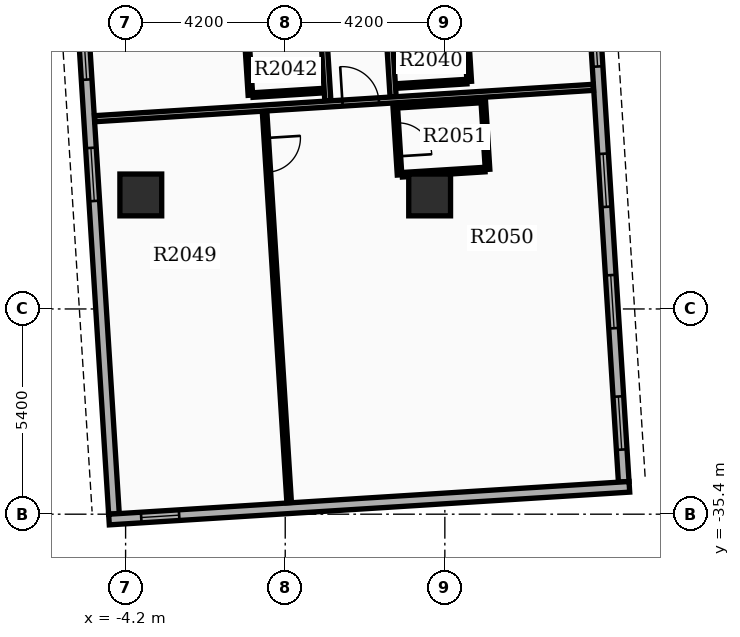
"""IFC4 building model, lengths in metres.
Left out: names, types, materials, properties, quantities, classifications, styles, units other than length and angle.
Written with IfcOpenShell. Run it as: python <this file> out.ifc"""

import sys

from ifc_helpers import new_model, si_unit, direction, frame, frame_2d, origin, origin_2d, place, context, subcontext, project, spatial, rectangle, extrude, element, fill, save


model = new_model("IFC4")
c1 = context("Model", 3, precision=1e-05, world=origin(), true_north=direction((0.0, 1.0)))
c2 = subcontext(c1, "Body", "Model", "MODEL_VIEW")
j1 = project(units=[si_unit("LENGTHUNIT", "METRE"), si_unit("PLANEANGLEUNIT", "RADIAN")], contexts=[c1])
p1 = place(None, origin())
s1 = spatial("IfcSite", under=j1, at=p1, CompositionType="ELEMENT")
p2 = place(p1, origin())
s2 = spatial("IfcBuilding", under=s1, at=p2, CompositionType="ELEMENT")
p3 = place(p2, frame((0.0, 0.0, 128.1)))
s3 = spatial("IfcBuildingStorey", under=s2, at=p3, CompositionType="ELEMENT", Elevation=128.1)
for number, where, z_axis, x_axis in (
    (1, (-3.8, -27.0, 0.0), (0.0, 0.0, 1.0), (1.0, 0.0, 0.0)),
    (2, (3.8, -27.0, 0.0), (0.0, 0.0, 1.0), (1.0, 0.0, 0.0)),
):
    element("IfcColumn", number, at=place(p3, frame(where, z_axis=z_axis, x_axis=x_axis)), inside=s3, PredefinedType="COLUMN", context=c2, shape_type="SweptSolid", body=[
        extrude(rectangle(XDim=1.1, YDim=1.1, at=origin_2d()), origin(), (0.0, 0.0, 1.0), 3.9),
    ])
p4 = place(p3, frame((-5.769, -15.333, 0.0), z_axis=(0.0, 0.0, 1.0), x_axis=(0.062784355807, -0.998027116198, 0.0)))
e3 = element("IfcWall", 3, at=p4, inside=s3, PredefinedType="STANDARD", context=c2, shape_type="SweptSolid", body=[
    extrude(rectangle(XDim=20.1, YDim=0.28, at=frame_2d((10.05, 0.0))), origin(), (0.0, 0.0, 1.0), 2.97),
])
p5 = place(p4, frame((0.85, 0.0, 0.8)))
e4 = element("IfcOpeningElement", 4, at=p5, cuts=e3, PredefinedType="OPENING", context=c2, shape_type="SweptSolid", body=[
    extrude(rectangle(XDim=1.4, YDim=1.6, at=frame_2d((0.7, 0.8))), frame((0.0, 0.15, 0.0), z_axis=(0.0, -1.0, 0.0), x_axis=(1.0, 0.0, 0.0)), (0.0, 0.0, 1.0), 0.3),
])
p6 = place(p4, frame((4.05, 0.0, 0.8)))
e5 = element("IfcOpeningElement", 5, at=p6, cuts=e3, PredefinedType="OPENING", context=c2, shape_type="SweptSolid", body=[
    extrude(rectangle(XDim=1.4, YDim=1.6, at=frame_2d((0.7, 0.8))), frame((0.0, 0.15, 0.0), z_axis=(0.0, -1.0, 0.0), x_axis=(1.0, 0.0, 0.0)), (0.0, 0.0, 1.0), 0.3),
])
p7 = place(p4, frame((7.25, 0.0, 0.8)))
e6 = element("IfcOpeningElement", 6, at=p7, cuts=e3, PredefinedType="OPENING", context=c2, shape_type="SweptSolid", body=[
    extrude(rectangle(XDim=1.4, YDim=1.6, at=frame_2d((0.7, 0.8))), frame((0.0, 0.15, 0.0), z_axis=(0.0, -1.0, 0.0), x_axis=(1.0, 0.0, 0.0)), (0.0, 0.0, 1.0), 0.3),
])
p8 = place(p4, frame((10.45, 0.0, 0.8)))
e7 = element("IfcOpeningElement", 7, at=p8, cuts=e3, PredefinedType="OPENING", context=c2, shape_type="SweptSolid", body=[
    extrude(rectangle(XDim=1.4, YDim=1.6, at=frame_2d((0.7, 0.8))), frame((0.0, 0.15, 0.0), z_axis=(0.0, -1.0, 0.0), x_axis=(1.0, 0.0, 0.0)), (0.0, 0.0, 1.0), 0.3),
])
p9 = place(p3, frame((8.907, -34.549, 0.0), z_axis=(0.0, 0.0, 1.0), x_axis=(-0.06279645424, 0.99802635503, 0.0)))
e8 = element("IfcWall", 8, at=p9, inside=s3, PredefinedType="STANDARD", context=c2, shape_type="SweptSolid", body=[
    extrude(rectangle(XDim=20.1, YDim=0.28, at=frame_2d((10.05, 0.0))), origin(), (0.0, 0.0, 1.0), 2.97),
])
p10 = place(p9, frame((0.85, 0.0, 0.8)))
e9 = element("IfcOpeningElement", 9, at=p10, cuts=e8, PredefinedType="OPENING", context=c2, shape_type="SweptSolid", body=[
    extrude(rectangle(XDim=1.4, YDim=1.6, at=frame_2d((0.7, 0.8))), frame((0.0, 0.15, 0.0), z_axis=(0.0, -1.0, 0.0), x_axis=(1.0, 0.0, 0.0)), (0.0, 0.0, 1.0), 0.3),
])
p11 = place(p9, frame((4.05, 0.0, 0.8)))
e10 = element("IfcOpeningElement", 10, at=p11, cuts=e8, PredefinedType="OPENING", context=c2, shape_type="SweptSolid", body=[
    extrude(rectangle(XDim=1.4, YDim=1.6, at=frame_2d((0.7, 0.8))), frame((0.0, 0.15, 0.0), z_axis=(0.0, -1.0, 0.0), x_axis=(1.0, 0.0, 0.0)), (0.0, 0.0, 1.0), 0.3),
])
p12 = place(p9, frame((7.25, 0.0, 0.8)))
e11 = element("IfcOpeningElement", 11, at=p12, cuts=e8, PredefinedType="OPENING", context=c2, shape_type="SweptSolid", body=[
    extrude(rectangle(XDim=1.4, YDim=1.6, at=frame_2d((0.7, 0.8))), frame((0.0, 0.15, 0.0), z_axis=(0.0, -1.0, 0.0), x_axis=(1.0, 0.0, 0.0)), (0.0, 0.0, 1.0), 0.3),
])
p13 = place(p9, frame((10.95, 0.0, 0.8)))
e12 = element("IfcOpeningElement", 12, at=p13, cuts=e8, PredefinedType="OPENING", context=c2, shape_type="SweptSolid", body=[
    extrude(rectangle(XDim=1.4, YDim=1.6, at=frame_2d((0.7, 0.8))), frame((0.0, 0.15, 0.0), z_axis=(0.0, -1.0, 0.0), x_axis=(1.0, 0.0, 0.0)), (0.0, 0.0, 1.0), 0.3),
])
p14 = place(p3, frame((-4.637, -35.541, 0.0), z_axis=(0.0, 0.0, 1.0), x_axis=(0.998026318072, 0.062797041623, 0.0)))
e13 = element("IfcWall", 13, at=p14, inside=s3, PredefinedType="STANDARD", context=c2, shape_type="SweptSolid", body=[
    extrude(rectangle(XDim=13.72, YDim=0.28, at=frame_2d((6.86, 0.0))), origin(), (0.0, 0.0, 1.0), 2.97),
])
p15 = place(p14, frame((0.85, 0.0, 0.85)))
e14 = element("IfcOpeningElement", 14, at=p15, cuts=e13, PredefinedType="OPENING", context=c2, shape_type="SweptSolid", body=[
    extrude(rectangle(XDim=1.0, YDim=1.5, at=frame_2d((0.5, 0.75))), frame((0.0, 0.15, 0.0), z_axis=(0.0, -1.0, 0.0), x_axis=(1.0, 0.0, 0.0)), (0.0, 0.0, 1.0), 0.3),
])
p16 = place(p3, frame((2.23, -14.739, 0.0), z_axis=(0.0, 0.0, 1.0), x_axis=(0.062771584278, -0.998027919553, 0.0)))
e15 = element("IfcWall", 15, at=p16, inside=s3, PredefinedType="PARTITIONING", context=c2, shape_type="SweptSolid", body=[
    extrude(rectangle(XDim=9.7, YDim=0.16, at=frame_2d((4.85, 0.0))), origin(), (0.0, 0.0, 1.0), 2.96),
])
p17 = place(p16, frame((1.033, 0.0, 0.0)))
e16 = element("IfcOpeningElement", 16, at=p17, cuts=e15, PredefinedType="OPENING", context=c2, shape_type="SweptSolid", body=[
    extrude(rectangle(XDim=0.96, YDim=2.15, at=frame_2d((0.48, 1.075))), frame((0.0, 0.09, 0.0), z_axis=(0.0, -1.0, 0.0), x_axis=(1.0, 0.0, 0.0)), (0.0, 0.0, 1.0), 0.18),
])
p18 = place(p3, frame((2.961, -24.132, 0.0), z_axis=(0.0, 0.0, 1.0), x_axis=(0.998027443946, 0.062779145668, 0.0)))
e17 = element("IfcWall", 17, at=p18, inside=s3, PredefinedType="PARTITIONING", context=c2, shape_type="SweptSolid", body=[
    extrude(rectangle(XDim=1.82, YDim=0.12, at=frame_2d((0.91, 0.0))), origin(), (0.0, 0.0, 1.0), 2.96),
])
p19 = place(p3, frame((4.724, -22.137, 0.0), z_axis=(0.0, 0.0, 1.0), x_axis=(0.062725942896, -0.998030789148, 0.0)))
e18 = element("IfcWall", 18, at=p19, inside=s3, PredefinedType="PARTITIONING", context=c2, shape_type="SweptSolid", body=[
    extrude(rectangle(XDim=1.88, YDim=0.12, at=frame_2d((0.94, 0.0))), origin(), (0.0, 0.0, 1.0), 2.96),
])
p20 = place(p3, frame((0.513, -14.847, 0.0), z_axis=(0.0, 0.0, 1.0), x_axis=(0.062798231534, -0.9980262432, 0.0)))
e19 = element("IfcWall", 19, at=p20, inside=s3, PredefinedType="PARTITIONING", context=c2, shape_type="SweptSolid", body=[
    extrude(rectangle(XDim=9.7, YDim=0.16, at=frame_2d((4.85, 0.0))), origin(), (0.0, 0.0, 1.0), 2.96),
])
p21 = place(p20, frame((1.033, 0.0, 0.0)))
e20 = element("IfcOpeningElement", 20, at=p21, cuts=e19, PredefinedType="OPENING", context=c2, shape_type="SweptSolid", body=[
    extrude(rectangle(XDim=0.96, YDim=2.15, at=frame_2d((0.48, 1.075))), frame((0.0, 0.09, 0.0), z_axis=(0.0, -1.0, 0.0), x_axis=(1.0, 0.0, 0.0)), (0.0, 0.0, 1.0), 0.18),
])
p22 = place(p3, frame((-0.851, -24.372, 0.0), z_axis=(0.0, 0.0, 1.0), x_axis=(0.998027443946, 0.062779145668, 0.0)))
e21 = element("IfcWall", 21, at=p22, inside=s3, PredefinedType="PARTITIONING", context=c2, shape_type="SweptSolid", body=[
    extrude(rectangle(XDim=1.82, YDim=0.12, at=frame_2d((0.91, 0.0))), origin(), (0.0, 0.0, 1.0), 2.96),
])
p23 = place(p3, frame((-1.034, -22.499, 0.0), z_axis=(0.0, 0.0, 1.0), x_axis=(0.062725942896, -0.998030789148, 0.0)))
e22 = element("IfcWall", 22, at=p23, inside=s3, PredefinedType="PARTITIONING", context=c2, shape_type="SweptSolid", body=[
    extrude(rectangle(XDim=1.88, YDim=0.12, at=frame_2d((0.94, 0.0))), origin(), (0.0, 0.0, 1.0), 2.96),
])
p24 = place(p3, frame((-5.012, -24.994, 0.0), z_axis=(0.0, 0.0, 1.0), x_axis=(0.998026109115, 0.062800362452, 0.0)))
e23 = element("IfcWall", 23, at=p24, inside=s3, PredefinedType="PARTITIONING", context=c2, shape_type="SweptSolid", body=[
    extrude(rectangle(XDim=13.144, YDim=0.16, at=frame_2d((6.572, 0.0))), origin(), (0.0, 0.0, 1.0), 2.96),
])
p25 = place(p24, frame((6.532, 0.0, 0.0)))
e24 = element("IfcOpeningElement", 24, at=p25, cuts=e23, PredefinedType="OPENING", context=c2, shape_type="SweptSolid", body=[
    extrude(rectangle(XDim=0.96, YDim=2.15, at=frame_2d((0.48, 1.075))), frame((0.0, 0.09, 0.0), z_axis=(0.0, -1.0, 0.0), x_axis=(1.0, 0.0, 0.0)), (0.0, 0.0, 1.0), 0.18),
])
p26 = place(p3, frame((-0.544, -24.803, 0.0), z_axis=(0.0, 0.0, 1.0), x_axis=(0.062786562543, -0.998026977373, 0.0)))
e25 = element("IfcWall", 25, at=p26, inside=s3, PredefinedType="PARTITIONING", context=c2, shape_type="SweptSolid", body=[
    extrude(rectangle(XDim=10.312, YDim=0.12, at=frame_2d((5.156, 0.0))), origin(), (0.0, 0.0, 1.0), 2.96),
])
p27 = place(p26, frame((0.7, 0.0, 0.0)))
e26 = element("IfcOpeningElement", 26, at=p27, cuts=e25, PredefinedType="OPENING", context=c2, shape_type="SweptSolid", body=[
    extrude(rectangle(XDim=0.9, YDim=2.1, at=frame_2d((0.45, 1.05))), frame((0.0, 0.07, 0.0), z_axis=(0.0, -1.0, 0.0), x_axis=(1.0, 0.0, 0.0)), (0.0, 0.0, 1.0), 0.14),
])
p28 = place(p3, frame((2.894, -24.657, 0.0), z_axis=(0.0, 0.0, 1.0), x_axis=(0.062912758763, -0.998019030272, 0.0)))
e27 = element("IfcWall", 27, at=p28, inside=s3, PredefinedType="PARTITIONING", context=c2, shape_type="SweptSolid", body=[
    extrude(rectangle(XDim=1.82, YDim=0.12, at=frame_2d((0.91, 0.0))), origin(), (0.0, 0.0, 1.0), 2.96),
])
p29 = place(p28, frame((0.45, 0.0, 0.0)))
e28 = element("IfcOpeningElement", 28, at=p29, cuts=e27, PredefinedType="OPENING", context=c2, shape_type="SweptSolid", body=[
    extrude(rectangle(XDim=0.88, YDim=2.1, at=frame_2d((0.44, 1.05))), frame((0.0, 0.07, 0.0), z_axis=(0.0, -1.0, 0.0), x_axis=(1.0, 0.0, 0.0)), (0.0, 0.0, 1.0), 0.14),
])
p30 = place(p3, frame((5.209, -24.511, 0.0), z_axis=(0.0, 0.0, 1.0), x_axis=(0.062645529196, -0.998035839873, 0.0)))
e29 = element("IfcWall", 29, at=p30, inside=s3, PredefinedType="PARTITIONING", context=c2, shape_type="SweptSolid", body=[
    extrude(rectangle(XDim=1.82, YDim=0.12, at=frame_2d((0.91, 0.0))), origin(), (0.0, 0.0, 1.0), 2.96),
])
p31 = place(p3, frame((2.964, -24.653, 0.0), z_axis=(0.0, 0.0, 1.0), x_axis=(0.99802414895, 0.06283150573, 0.0)))
e30 = element("IfcWall", 30, at=p31, inside=s3, PredefinedType="PARTITIONING", context=c2, shape_type="SweptSolid", body=[
    extrude(rectangle(XDim=2.18, YDim=0.12, at=frame_2d((1.09, 0.0))), origin(), (0.0, 0.0, 1.0), 2.96),
])
p32 = place(p3, frame((3.078, -26.469, 0.0), z_axis=(0.0, 0.0, 1.0), x_axis=(0.998024591026, 0.062824483344, 0.0)))
e31 = element("IfcWall", 31, at=p32, inside=s3, PredefinedType="PARTITIONING", context=c2, shape_type="SweptSolid", body=[
    extrude(rectangle(XDim=2.18, YDim=0.12, at=frame_2d((1.09, 0.0))), origin(), (0.0, 0.0, 1.0), 2.96),
])
p33 = place(p7, origin())
e32 = element("IfcWindow", 32, at=p33, inside=s3, PartitioningType="SINGLE_PANEL", PredefinedType="WINDOW", context=c2, shape_type="SweptSolid", body=[
    extrude(rectangle(XDim=1.4, YDim=1.6, at=frame_2d((0.7, 0.8))), frame((0.0, 0.03, 0.0), z_axis=(0.0, -1.0, 0.0), x_axis=(1.0, 0.0, 0.0)), (0.0, 0.0, 1.0), 0.06),
])
fill(e6, e32)
p34 = place(p8, origin())
e33 = element("IfcWindow", 33, at=p34, inside=s3, PartitioningType="SINGLE_PANEL", PredefinedType="WINDOW", context=c2, shape_type="SweptSolid", body=[
    extrude(rectangle(XDim=1.4, YDim=1.6, at=frame_2d((0.7, 0.8))), frame((0.0, 0.03, 0.0), z_axis=(0.0, -1.0, 0.0), x_axis=(1.0, 0.0, 0.0)), (0.0, 0.0, 1.0), 0.06),
])
fill(e7, e33)
p35 = place(p10, origin())
e34 = element("IfcWindow", 34, at=p35, inside=s3, PartitioningType="SINGLE_PANEL", PredefinedType="WINDOW", context=c2, shape_type="SweptSolid", body=[
    extrude(rectangle(XDim=1.4, YDim=1.6, at=frame_2d((0.7, 0.8))), frame((0.0, 0.03, 0.0), z_axis=(0.0, -1.0, 0.0), x_axis=(1.0, 0.0, 0.0)), (0.0, 0.0, 1.0), 0.06),
])
fill(e9, e34)
p36 = place(p11, origin())
e35 = element("IfcWindow", 35, at=p36, inside=s3, PartitioningType="SINGLE_PANEL", PredefinedType="WINDOW", context=c2, shape_type="SweptSolid", body=[
    extrude(rectangle(XDim=1.4, YDim=1.6, at=frame_2d((0.7, 0.8))), frame((0.0, 0.03, 0.0), z_axis=(0.0, -1.0, 0.0), x_axis=(1.0, 0.0, 0.0)), (0.0, 0.0, 1.0), 0.06),
])
fill(e10, e35)
p37 = place(p12, origin())
e36 = element("IfcWindow", 36, at=p37, inside=s3, PartitioningType="SINGLE_PANEL", PredefinedType="WINDOW", context=c2, shape_type="SweptSolid", body=[
    extrude(rectangle(XDim=1.4, YDim=1.6, at=frame_2d((0.7, 0.8))), frame((0.0, 0.03, 0.0), z_axis=(0.0, -1.0, 0.0), x_axis=(1.0, 0.0, 0.0)), (0.0, 0.0, 1.0), 0.06),
])
fill(e11, e36)
p38 = place(p13, origin())
e37 = element("IfcWindow", 37, at=p38, inside=s3, PartitioningType="SINGLE_PANEL", PredefinedType="WINDOW", context=c2, shape_type="SweptSolid", body=[
    extrude(rectangle(XDim=1.4, YDim=1.6, at=frame_2d((0.7, 0.8))), frame((0.0, 0.03, 0.0), z_axis=(0.0, -1.0, 0.0), x_axis=(1.0, 0.0, 0.0)), (0.0, 0.0, 1.0), 0.06),
])
fill(e12, e37)
p39 = place(p15, origin())
e38 = element("IfcWindow", 38, at=p39, inside=s3, PartitioningType="SINGLE_PANEL", PredefinedType="WINDOW", context=c2, shape_type="SweptSolid", body=[
    extrude(rectangle(XDim=1.0, YDim=1.5, at=frame_2d((0.5, 0.75))), frame((0.0, 0.03, 0.0), z_axis=(0.0, -1.0, 0.0), x_axis=(1.0, 0.0, 0.0)), (0.0, 0.0, 1.0), 0.06),
])
fill(e14, e38)
p40 = place(p25, origin())
e39 = element("IfcDoor", 39, at=p40, inside=s3, OperationType="SINGLE_SWING_LEFT", PredefinedType="DOOR", context=c2, shape_type="SweptSolid", body=[
    extrude(rectangle(XDim=0.96, YDim=2.15, at=frame_2d((0.48, 1.075))), frame((0.0, 0.025, 0.0), z_axis=(0.0, -1.0, 0.0), x_axis=(1.0, 0.0, 0.0)), (0.0, 0.0, 1.0), 0.05),
])
fill(e24, e39)
p41 = place(p27, origin())
e40 = element("IfcDoor", 40, at=p41, inside=s3, OperationType="SINGLE_SWING_LEFT", PredefinedType="DOOR", context=c2, shape_type="SweptSolid", body=[
    extrude(rectangle(XDim=0.9, YDim=2.1, at=frame_2d((0.45, 1.05))), frame((0.0, 0.025, 0.0), z_axis=(0.0, -1.0, 0.0), x_axis=(1.0, 0.0, 0.0)), (0.0, 0.0, 1.0), 0.05),
])
fill(e26, e40)
p42 = place(p29, origin())
e41 = element("IfcDoor", 41, at=p42, inside=s3, OperationType="SINGLE_SWING_RIGHT", PredefinedType="DOOR", context=c2, shape_type="SweptSolid", body=[
    extrude(rectangle(XDim=0.88, YDim=2.1, at=frame_2d((0.44, 1.05))), frame((0.0, 0.025, 0.0), z_axis=(0.0, -1.0, 0.0), x_axis=(1.0, 0.0, 0.0)), (0.0, 0.0, 1.0), 0.05),
])
fill(e28, e41)
save(model, sys.argv[1])
